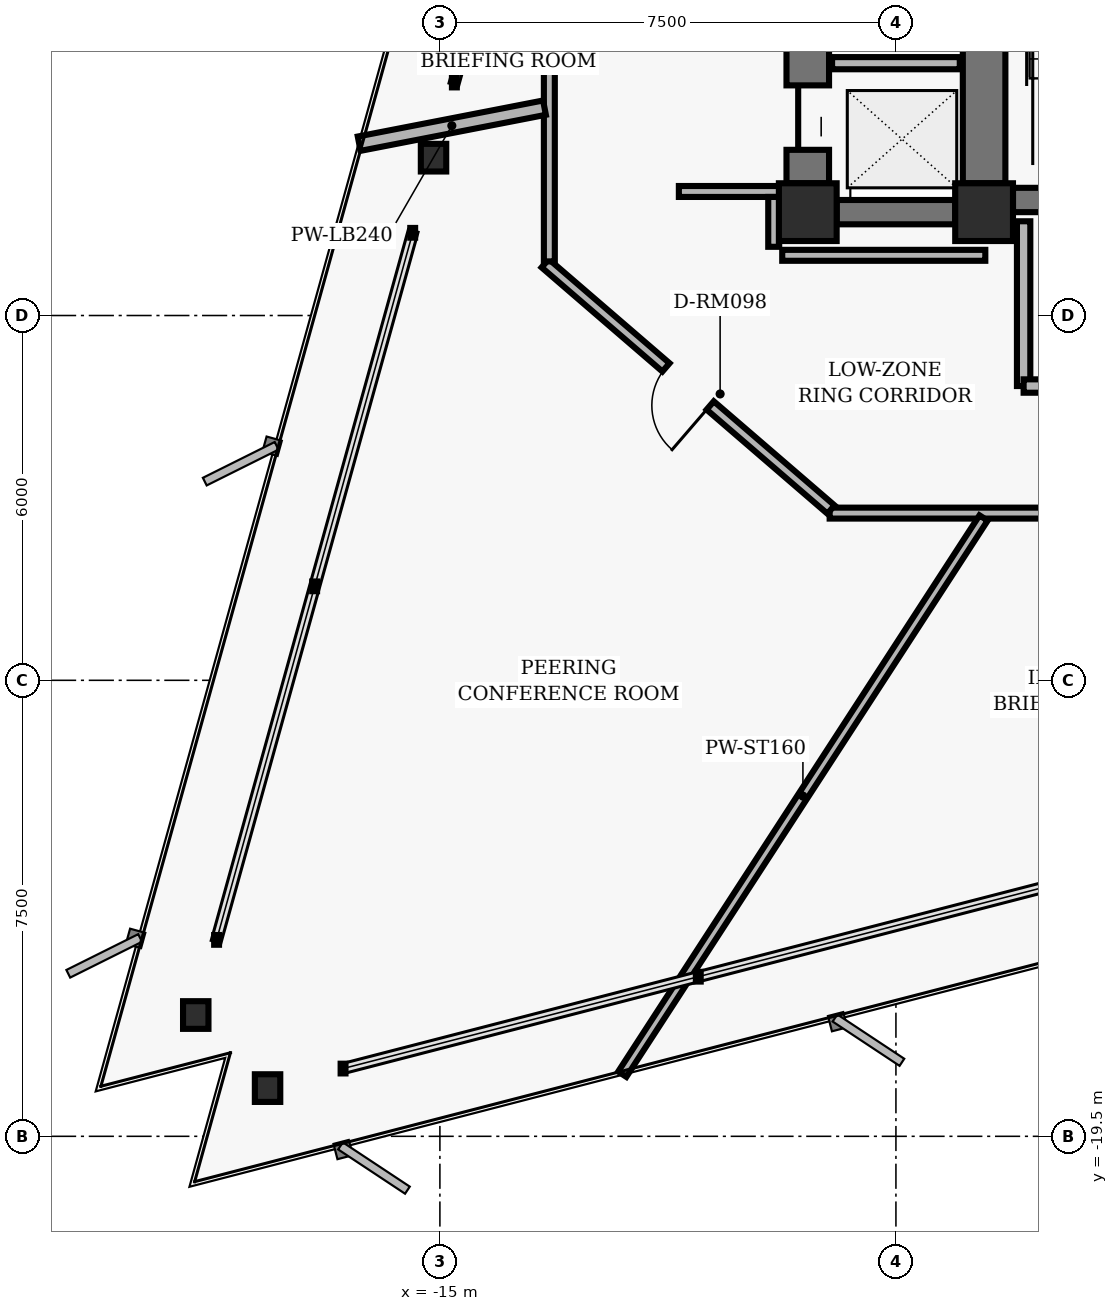
"""IFC4 building model, lengths in metres.
Left out: names, types, materials, properties, quantities, classifications, styles, units other than length and angle.
Written with IfcOpenShell. Run it as: python <this file> out.ifc"""

import sys

from ifc_helpers import new_model, si_unit, direction, frame, frame_2d, origin, origin_2d, place, context, subcontext, project, spatial, rectangle, hollow_rectangle, i_section, extrude, element, fill, save


model = new_model("IFC4")
c1 = context("Model", 3, precision=1e-05, world=origin(), true_north=direction((0.0, 1.0)))
c2 = subcontext(c1, "Body", "Model", "MODEL_VIEW")
j1 = project(units=[si_unit("LENGTHUNIT", "METRE"), si_unit("PLANEANGLEUNIT", "RADIAN")], contexts=[c1])
p1 = place(None, origin())
s1 = spatial("IfcSite", under=j1, at=p1, CompositionType="ELEMENT")
p2 = place(p1, origin())
s2 = spatial("IfcBuilding", under=s1, at=p2, CompositionType="ELEMENT")
p3 = place(p2, frame((0.0, 0.0, 76.48)))
s3 = spatial("IfcBuildingStorey", under=s2, at=p3, CompositionType="ELEMENT", Elevation=76.48)
for number, where, z_axis, x_axis in (
    (1, (-6.05, -4.3, 0.0), (0.0, 0.0, 1.0), (1.0, 0.0, 0.0)),
    (2, (-8.95, -4.3, 0.0), (0.0, 0.0, 1.0), (1.0, 0.0, 0.0)),
):
    element("IfcColumn", number, at=place(p3, frame(where, z_axis=z_axis, x_axis=x_axis)), inside=s3, PredefinedType="COLUMN", context=c2, shape_type="SweptSolid", body=[
        extrude(hollow_rectangle(XDim=0.95, YDim=0.95, WallThickness=0.06, InnerFilletRadius=0.02, OuterFilletRadius=0.04, at=origin_2d()), origin(), (0.0, 0.0, 1.0), 3.04),
    ])
p4 = place(p3, frame((-6.05, -3.825, 0.0), z_axis=(0.0, 0.0, 1.0), x_axis=(0.0, 1.0, 0.0)))
e3 = element("IfcWall", 3, at=p4, inside=s3, PredefinedType="SHEAR", context=c2, shape_type="SweptSolid", body=[
    extrude(rectangle(XDim=3.35, YDim=0.7, at=frame_2d((1.675, 0.0))), origin(), (0.0, 0.0, 1.0), 2.788),
])
p5 = place(p3, frame((-5.575, -4.1, 0.0), z_axis=(0.0, 0.0, 1.0), x_axis=(1.0, 0.0, 0.0)))
e4 = element("IfcWall", 4, at=p5, inside=s3, PredefinedType="SHEAR", context=c2, shape_type="SweptSolid", body=[
    extrude(rectangle(XDim=11.15, YDim=0.4, at=frame_2d((5.575, 0.0))), origin(), (0.0, 0.0, 1.0), 2.788),
])
p6 = place(p5, frame((1.305, 0.0, 0.0)))
e5 = element("IfcOpeningElement", 5, at=p6, cuts=e4, PredefinedType="OPENING", context=c2, shape_type="SweptSolid", body=[
    extrude(rectangle(XDim=1.1, YDim=2.04, at=frame_2d((0.55, 1.02))), frame((0.0, 0.21, 0.0), z_axis=(0.0, -1.0, 0.0), x_axis=(1.0, 0.0, 0.0)), (0.0, 0.0, 1.0), 0.42),
])
p7 = place(p5, frame((8.745, 0.0, 0.0)))
e6 = element("IfcOpeningElement", 6, at=p7, cuts=e4, PredefinedType="OPENING", context=c2, shape_type="SweptSolid", body=[
    extrude(rectangle(XDim=1.1, YDim=2.04, at=frame_2d((0.55, 1.02))), frame((0.0, 0.21, 0.0), z_axis=(0.0, -1.0, 0.0), x_axis=(1.0, 0.0, 0.0)), (0.0, 0.0, 1.0), 0.42),
])
p8 = place(p5, frame((4.045, 0.0, 0.0)))
e7 = element("IfcOpeningElement", 7, at=p8, cuts=e4, PredefinedType="OPENING", context=c2, shape_type="SweptSolid", body=[
    extrude(rectangle(XDim=1.06, YDim=2.04, at=frame_2d((0.53, 1.02))), frame((0.0, 0.21, 0.0), z_axis=(0.0, -1.0, 0.0), x_axis=(1.0, 0.0, 0.0)), (0.0, 0.0, 1.0), 0.42),
])
p9 = place(p5, frame((6.045, 0.0, 0.0)))
e8 = element("IfcOpeningElement", 8, at=p9, cuts=e4, PredefinedType="OPENING", context=c2, shape_type="SweptSolid", body=[
    extrude(rectangle(XDim=1.06, YDim=2.04, at=frame_2d((0.53, 1.02))), frame((0.0, 0.21, 0.0), z_axis=(0.0, -1.0, 0.0), x_axis=(1.0, 0.0, 0.0)), (0.0, 0.0, 1.0), 0.42),
])
p10 = place(p3, frame((-8.95, -3.825, 0.0), z_axis=(0.0, 0.0, 1.0), x_axis=(0.0, 1.0, 0.0)))
e9 = element("IfcWall", 9, at=p10, inside=s3, PredefinedType="SHEAR", context=c2, shape_type="SweptSolid", body=[
    extrude(rectangle(XDim=7.85, YDim=0.7, at=frame_2d((3.925, 0.0))), origin(), (0.0, 0.0, 1.0), 2.788),
])
p11 = place(p10, frame((0.55, 0.0, 0.0)))
e10 = element("IfcOpeningElement", 10, at=p11, cuts=e9, PredefinedType="OPENING", context=c2, shape_type="SweptSolid", body=[
    extrude(rectangle(XDim=1.06, YDim=2.04, at=frame_2d((0.53, 1.02))), frame((0.0, 0.36, 0.0), z_axis=(0.0, -1.0, 0.0), x_axis=(1.0, 0.0, 0.0)), (0.0, 0.0, 1.0), 0.72),
])
p12 = place(p10, frame((3.395, 0.0, 0.0)))
e11 = element("IfcOpeningElement", 11, at=p12, cuts=e9, PredefinedType="OPENING", context=c2, shape_type="SweptSolid", body=[
    extrude(rectangle(XDim=1.06, YDim=2.04, at=frame_2d((0.53, 1.02))), frame((0.0, 0.36, 0.0), z_axis=(0.0, -1.0, 0.0), x_axis=(1.0, 0.0, 0.0)), (0.0, 0.0, 1.0), 0.72),
])
p13 = place(p10, frame((6.23, 0.0, 0.0)))
e12 = element("IfcOpeningElement", 12, at=p13, cuts=e9, PredefinedType="OPENING", context=c2, shape_type="SweptSolid", body=[
    extrude(rectangle(XDim=1.06, YDim=2.04, at=frame_2d((0.53, 1.02))), frame((0.0, 0.36, 0.0), z_axis=(0.0, -1.0, 0.0), x_axis=(1.0, 0.0, 0.0)), (0.0, 0.0, 1.0), 0.72),
])
p14 = place(p3, frame((-8.475, -4.3, 0.0), z_axis=(0.0, 0.0, 1.0), x_axis=(1.0, 0.0, 0.0)))
e13 = element("IfcWall", 13, at=p14, inside=s3, PredefinedType="SHEAR", context=c2, shape_type="SweptSolid", body=[
    extrude(rectangle(XDim=1.95, YDim=0.4, at=frame_2d((0.975, 0.0))), origin(), (0.0, 0.0, 1.0), 2.788),
])
for number, where, z_axis, x_axis in (
    (14, (-15.104, -3.404, 0.0), (0.0, 0.0, 1.0), (1.0, 0.0, 0.0)),
    (15, (-19.015, -17.505, 0.0), (0.0, 0.0, 1.0), (1.0, 0.0, 0.0)),
    (16, (-17.834, -18.707, 0.0), (0.0, 0.0, 1.0), (1.0, 0.0, 0.0)),
):
    element("IfcColumn", number, at=place(p3, frame(where, z_axis=z_axis, x_axis=x_axis)), inside=s3, PredefinedType="COLUMN", context=c2, shape_type="SweptSolid", body=[
        extrude(i_section(OverallWidth=0.418, OverallDepth=0.455, WebThickness=0.042, FlangeThickness=0.068, FilletRadius=0.025, at=origin_2d()), origin(), (0.0, 0.0, 1.0), 3.04),
    ])
p15 = place(p3, frame((-5.4, -7.16, 0.0), z_axis=(0.0, 0.0, 1.0), x_axis=(0.0, 1.0, 0.0)))
e17 = element("IfcWall", 17, at=p15, inside=s3, PredefinedType="PARTITIONING", context=c2, shape_type="SweptSolid", body=[
    extrude(rectangle(XDim=2.71, YDim=0.22, at=frame_2d((1.355, 0.0))), origin(), (0.0, 0.0, 1.0), 2.763),
])
p16 = place(p3, frame((-5.4, -7.16, 0.0), z_axis=(0.0, 0.0, 1.0), x_axis=(1.0, 0.0, 0.0)))
e18 = element("IfcWall", 18, at=p16, inside=s3, PredefinedType="PARTITIONING", context=c2, shape_type="SweptSolid", body=[
    extrude(rectangle(XDim=5.4, YDim=0.22, at=frame_2d((2.7, 0.0))), origin(), (0.0, 0.0, 1.0), 2.763),
])
p17 = place(p16, frame((2.05, 0.0, 0.0)))
e19 = element("IfcOpeningElement", 19, at=p17, cuts=e18, PredefinedType="OPENING", context=c2, shape_type="SweptSolid", body=[
    extrude(rectangle(XDim=1.12, YDim=2.02, at=frame_2d((0.56, 1.01))), frame((0.0, 0.12, 0.0), z_axis=(0.0, -1.0, 0.0), x_axis=(1.0, 0.0, 0.0)), (0.0, 0.0, 1.0), 0.24),
])
p18 = place(p3, frame((-8.55, -1.85, 0.0), z_axis=(0.0, 0.0, 1.0), x_axis=(1.0, 0.0, 0.0)))
e20 = element("IfcWall", 20, at=p18, inside=s3, PredefinedType="PARTITIONING", context=c2, shape_type="SweptSolid", body=[
    extrude(rectangle(XDim=2.1, YDim=0.2, at=frame_2d((1.05, 0.0))), origin(), (0.0, 0.0, 1.0), 2.763),
])
p19 = place(p3, frame((8.41, -9.25, 0.0), z_axis=(0.0, 0.0, 1.0), x_axis=(-1.0, 0.0, 0.0)))
e21 = element("IfcWall", 21, at=p19, inside=s3, PredefinedType="PARTITIONING", context=c2, shape_type="SweptSolid", body=[
    extrude(rectangle(XDim=17.0, YDim=0.18, at=frame_2d((8.5, 0.0))), origin(), (0.0, 0.0, 1.0), 2.277),
])
p20 = place(p19, frame((9.888, 0.0, 0.0)))
e22 = element("IfcOpeningElement", 22, at=p20, cuts=e21, PredefinedType="OPENING", context=c2, shape_type="SweptSolid", body=[
    extrude(rectangle(XDim=0.96, YDim=2.02, at=frame_2d((0.48, 1.01))), frame((0.0, 0.1, 0.0), z_axis=(0.0, -1.0, 0.0), x_axis=(1.0, 0.0, 0.0)), (0.0, 0.0, 1.0), 0.2),
])
p21 = place(p19, frame((2.777, 0.0, 0.0)))
e23 = element("IfcOpeningElement", 23, at=p21, cuts=e21, PredefinedType="OPENING", context=c2, shape_type="SweptSolid", body=[
    extrude(rectangle(XDim=0.96, YDim=2.02, at=frame_2d((0.48, 1.01))), frame((0.0, 0.1, 0.0), z_axis=(0.0, -1.0, 0.0), x_axis=(1.0, 0.0, 0.0)), (0.0, 0.0, 1.0), 0.2),
])
p22 = place(p3, frame((-8.568, -9.191, 0.0), z_axis=(0.0, 0.0, 1.0), x_axis=(-0.757556899173, 0.652769135694, 0.0)))
e24 = element("IfcWall", 24, at=p22, inside=s3, PredefinedType="PARTITIONING", context=c2, shape_type="SweptSolid", body=[
    extrude(rectangle(XDim=6.204, YDim=0.18, at=frame_2d((3.102, 0.0))), origin(), (0.0, 0.0, 1.0), 2.763),
])
p23 = place(p22, frame((2.622, 0.0, 0.0)))
e25 = element("IfcOpeningElement", 25, at=p23, cuts=e24, PredefinedType="OPENING", context=c2, shape_type="SweptSolid", body=[
    extrude(rectangle(XDim=0.96, YDim=2.02, at=frame_2d((0.48, 1.01))), frame((0.0, 0.1, 0.0), z_axis=(0.0, -1.0, 0.0), x_axis=(1.0, 0.0, 0.0)), (0.0, 0.0, 1.0), 0.2),
])
p24 = place(p3, frame((-13.2, -5.11, 0.0), z_axis=(0.0, 0.0, 1.0), x_axis=(0.0, 1.0, 0.0)))
e26 = element("IfcWall", 26, at=p24, inside=s3, PredefinedType="PARTITIONING", context=c2, shape_type="SweptSolid", body=[
    extrude(rectangle(XDim=10.22, YDim=0.18, at=frame_2d((5.11, 0.0))), origin(), (0.0, 0.0, 1.0), 2.143),
])
p25 = place(p24, frame((5.765, 0.0, 0.0)))
e27 = element("IfcOpeningElement", 27, at=p25, cuts=e26, PredefinedType="OPENING", context=c2, shape_type="SweptSolid", body=[
    extrude(rectangle(XDim=0.96, YDim=2.02, at=frame_2d((0.48, 1.01))), frame((0.0, 0.1, 0.0), z_axis=(0.0, -1.0, 0.0), x_axis=(1.0, 0.0, 0.0)), (0.0, 0.0, 1.0), 0.2),
])
p26 = place(p3, frame((-11.07, -3.96, 0.0), z_axis=(0.0, 0.0, 1.0), x_axis=(1.0, 0.0, 0.0)))
e28 = element("IfcWall", 28, at=p26, inside=s3, PredefinedType="PARTITIONING", context=c2, shape_type="SweptSolid", body=[
    extrude(rectangle(XDim=1.65, YDim=0.18, at=frame_2d((0.825, 0.0))), origin(), (0.0, 0.0, 1.0), 2.048),
])
p27 = place(p3, frame((-9.51, -4.05, 0.0), z_axis=(0.0, 0.0, 1.0), x_axis=(0.0, -1.0, 0.0)))
e29 = element("IfcWall", 29, at=p27, inside=s3, PredefinedType="PARTITIONING", context=c2, shape_type="SweptSolid", body=[
    extrude(rectangle(XDim=0.82, YDim=0.18, at=frame_2d((0.41, 0.0))), origin(), (0.0, 0.0, 1.0), 2.763),
])
p28 = place(p3, frame((-9.37, -5.01, 0.0), z_axis=(0.0, 0.0, 1.0), x_axis=(1.0, 0.0, 0.0)))
e30 = element("IfcWall", 30, at=p28, inside=s3, PredefinedType="PARTITIONING", context=c2, shape_type="SweptSolid", body=[
    extrude(rectangle(XDim=3.34, YDim=0.18, at=frame_2d((1.67, 0.0))), origin(), (0.0, 0.0, 1.0), 2.763),
])
p29 = place(p3, frame((-13.28, -2.581, 0.0), z_axis=(0.0, 0.0, 1.0), x_axis=(-0.98161907283, -0.190850716155, 0.0)))
e31 = element("IfcWall", 31, at=p29, inside=s3, PredefinedType="PARTITIONING", context=c2, shape_type="SweptSolid", body=[
    extrude(rectangle(XDim=3.105, YDim=0.24, at=frame_2d((1.552, 0.0))), origin(), (0.0, 0.0, 1.0), 2.763),
])
p30 = place(p3, frame((-6.059, -9.33, 0.0), z_axis=(0.0, 0.0, 1.0), x_axis=(-0.544635087887, -0.838673131227, 0.0)))
e32 = element("IfcWall", 32, at=p30, inside=s3, PredefinedType="PARTITIONING", context=c2, shape_type="SweptSolid", body=[
    extrude(rectangle(XDim=10.908, YDim=0.16, at=frame_2d((5.454, 0.0))), origin(), (0.0, 0.0, 1.0), 2.763),
])
p31 = place(p11, origin())
e33 = element("IfcDoor", 33, at=p31, inside=s3, OperationType="SLIDING_TO_LEFT", PredefinedType="DOOR", context=c2, shape_type="SweptSolid", body=[
    extrude(rectangle(XDim=1.06, YDim=2.04, at=frame_2d((0.53, 1.02))), frame((0.0, 0.025, 0.0), z_axis=(0.0, -1.0, 0.0), x_axis=(1.0, 0.0, 0.0)), (0.0, 0.0, 1.0), 0.05),
])
fill(e10, e33)
p32 = place(p23, origin())
e34 = element("IfcDoor", 34, at=p32, inside=s3, OperationType="SINGLE_SWING_LEFT", PredefinedType="DOOR", context=c2, shape_type="SweptSolid", body=[
    extrude(rectangle(XDim=0.96, YDim=2.02, at=frame_2d((0.48, 1.01))), frame((0.0, 0.025, 0.0), z_axis=(0.0, -1.0, 0.0), x_axis=(1.0, 0.0, 0.0)), (0.0, 0.0, 1.0), 0.05),
])
fill(e25, e34)
save(model, sys.argv[1])
